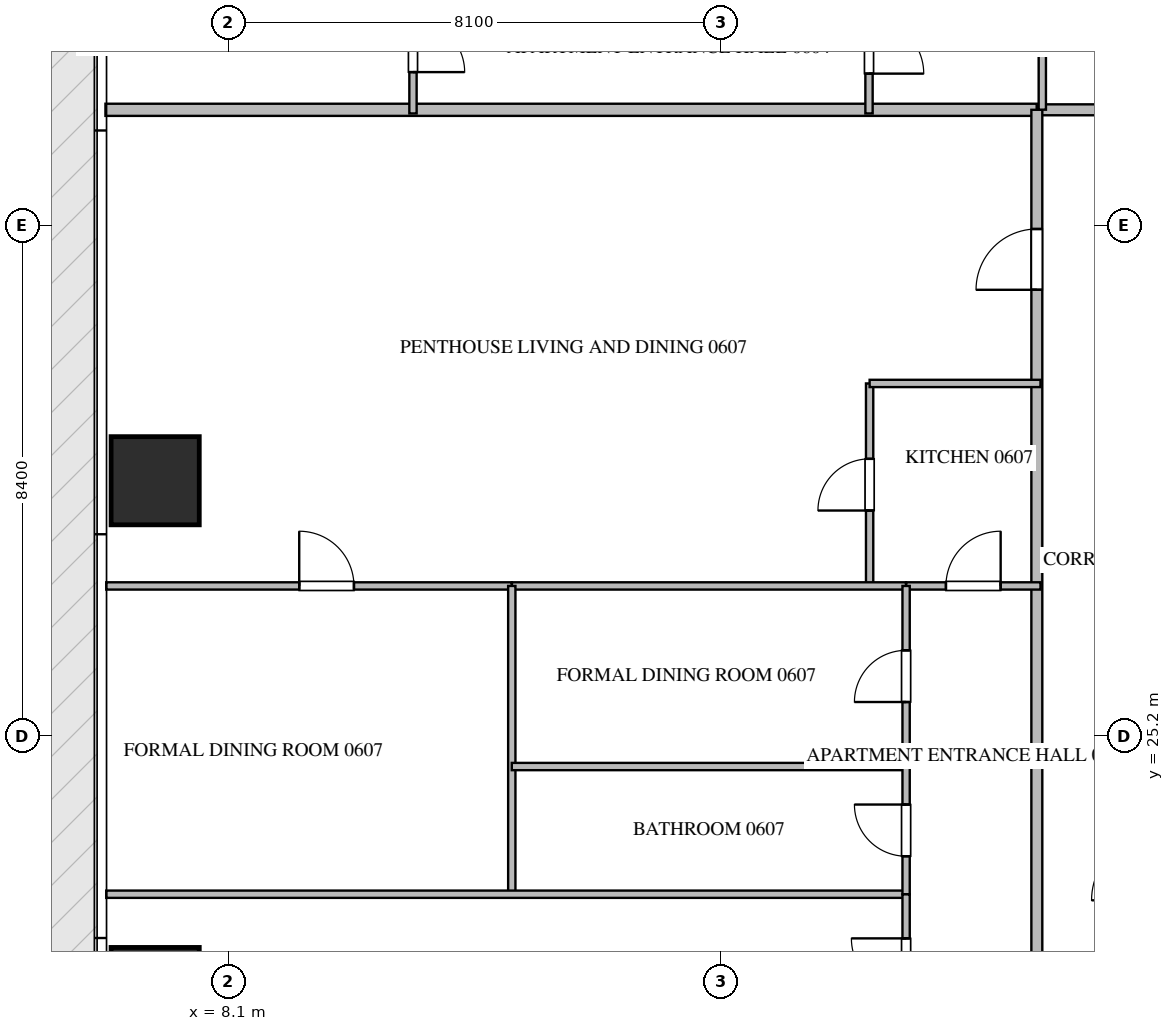
"""IFC4 building model, lengths in metres.
Left out: names, types, materials, properties, quantities, classifications, styles, units other than length and angle.
Written with IfcOpenShell. Run it as: python <this file> out.ifc"""

import sys

from ifc_helpers import new_model, si_unit, direction, frame, frame_2d, origin, origin_2d, place, context, subcontext, project, spatial, rectangle, extrude, source, transform, mapped, element, fill, save


model = new_model("IFC4")
c1 = context("Model", 3, precision=1e-05, world=origin(), true_north=direction((0.0, 1.0)))
c2 = subcontext(c1, "Body", "Model", "MODEL_VIEW")
j1 = project(units=[si_unit("LENGTHUNIT", "METRE"), si_unit("PLANEANGLEUNIT", "RADIAN")], contexts=[c1])
p1 = place(None, origin())
s1 = spatial("IfcSite", under=j1, at=p1, CompositionType="ELEMENT")
p2 = place(p1, origin())
s2 = spatial("IfcBuilding", under=s1, at=p2, CompositionType="ELEMENT")
p3 = place(p2, frame((0.0, 0.0, 30.45)))
s3 = spatial("IfcBuildingStorey", under=s2, at=p3, CompositionType="ELEMENT", Elevation=30.45)
m1 = source(origin(), c2, "Body", "SweptSolid", [
    extrude(rectangle(XDim=1.45, YDim=1.45, at=origin_2d()), origin(), (0.0, 0.0, 1.0), 3.75),
])
for number, where, z_axis, x_axis in (
    (1, (6.9, 21.0, -0.26), (0.0, 0.0, 1.0), (1.0, 0.0, 0.0)),
    (2, (6.9, 29.4, -0.26), (0.0, 0.0, 1.0), (1.0, 0.0, 0.0)),
):
    element("IfcColumn", number, at=place(p3, frame(where, z_axis=z_axis, x_axis=x_axis)), inside=s3, PredefinedType="COLUMN", context=c2, shape_type="MappedRepresentation", body=[
        mapped(m1, transform((0.0, 0.0, 0.0), scale=1.0)),
    ])
p4 = place(p3, frame((6.082, 35.5, 0.0), z_axis=(0.0, 0.0, 1.0), x_axis=(1.0, 0.0, 0.0)))
e3 = element("IfcWall", 3, at=p4, inside=s3, PredefinedType="PARTITIONING", context=c2, shape_type="SweptSolid", body=[
    extrude(rectangle(XDim=15.318, YDim=0.2, at=frame_2d((7.659, 0.0))), origin(), (0.0, 0.0, 1.0), 3.49),
])
p5 = place(p3, frame((21.402, 35.5, 0.0), z_axis=(0.0, 0.0, 1.0), x_axis=(1.0, 0.0, 0.0)))
e4 = element("IfcWall", 4, at=p5, inside=s3, PredefinedType="PARTITIONING", context=c2, shape_type="SweptSolid", body=[
    extrude(rectangle(XDim=21.996, YDim=0.18, at=frame_2d((10.998, 0.0))), origin(), (0.0, 0.0, 1.0), 3.49),
])
p6 = place(p5, frame((2.1, 0.0, 0.0)))
e5 = element("IfcOpeningElement", 5, at=p6, cuts=e4, PredefinedType="OPENING", context=c2, shape_type="SweptSolid", body=[
    extrude(rectangle(XDim=1.0, YDim=2.15, at=frame_2d((0.5, 1.075))), frame((0.0, 0.1, 0.0), z_axis=(0.0, -1.0, 0.0), x_axis=(1.0, 0.0, 0.0)), (0.0, 0.0, 1.0), 0.2),
])
p7 = place(p5, frame((14.277, 0.0, 0.0)))
e6 = element("IfcOpeningElement", 6, at=p7, cuts=e4, PredefinedType="OPENING", context=c2, shape_type="SweptSolid", body=[
    extrude(rectangle(XDim=1.0, YDim=2.15, at=frame_2d((0.5, 1.075))), frame((0.0, 0.1, 0.0), z_axis=(0.0, -1.0, 0.0), x_axis=(1.0, 0.0, 0.0)), (0.0, 0.0, 1.0), 0.2),
])
p8 = place(p5, frame((18.896, 0.0, 0.0)))
e7 = element("IfcOpeningElement", 7, at=p8, cuts=e4, PredefinedType="OPENING", context=c2, shape_type="SweptSolid", body=[
    extrude(rectangle(XDim=1.0, YDim=2.15, at=frame_2d((0.5, 1.075))), frame((0.0, 0.1, 0.0), z_axis=(0.0, -1.0, 0.0), x_axis=(1.0, 0.0, 0.0)), (0.0, 0.0, 1.0), 0.2),
])
p9 = place(p3, frame((21.4, 14.9, 0.0), z_axis=(0.0, 0.0, 1.0), x_axis=(0.0, 1.0, 0.0)))
e8 = element("IfcWall", 8, at=p9, inside=s3, PredefinedType="PARTITIONING", context=c2, shape_type="SweptSolid", body=[
    extrude(rectangle(XDim=20.6, YDim=0.18, at=frame_2d((10.3, 0.0))), origin(), (0.0, 0.0, 1.0), 3.49),
])
p10 = place(p9, frame((17.64, 0.0, 0.0)))
e9 = element("IfcOpeningElement", 9, at=p10, cuts=e8, PredefinedType="OPENING", context=c2, shape_type="SweptSolid", body=[
    extrude(rectangle(XDim=1.0, YDim=2.15, at=frame_2d((0.5, 1.075))), frame((0.0, 0.1, 0.0), z_axis=(0.0, -1.0, 0.0), x_axis=(1.0, 0.0, 0.0)), (0.0, 0.0, 1.0), 0.2),
])
p11 = place(p3, frame((21.49, 38.25, 0.0), z_axis=(0.0, 0.0, 1.0), x_axis=(0.0, -1.0, 0.0)))
e10 = element("IfcWall", 10, at=p11, inside=s3, PredefinedType="PARTITIONING", context=c2, shape_type="SweptSolid", body=[
    extrude(rectangle(XDim=2.748, YDim=0.12, at=frame_2d((1.374, 0.0))), origin(), (0.0, 0.0, 1.0), 3.49),
])
p12 = place(p3, frame((18.64, 37.65, 0.0), z_axis=(0.0, 0.0, 1.0), x_axis=(0.0, -1.0, 0.0)))
e11 = element("IfcWall", 11, at=p12, inside=s3, PredefinedType="PARTITIONING", context=c2, shape_type="SweptSolid", body=[
    extrude(rectangle(XDim=2.21, YDim=0.12, at=frame_2d((1.105, 0.0))), origin(), (0.0, 0.0, 1.0), 3.49),
])
p13 = place(p12, frame((0.655, 0.0, 0.0)))
e12 = element("IfcOpeningElement", 12, at=p13, cuts=e11, PredefinedType="OPENING", context=c2, shape_type="SweptSolid", body=[
    extrude(rectangle(XDim=0.9, YDim=2.1, at=frame_2d((0.45, 1.05))), frame((0.0, 0.07, 0.0), z_axis=(0.0, -1.0, 0.0), x_axis=(1.0, 0.0, 0.0)), (0.0, 0.0, 1.0), 0.14),
])
p14 = place(p3, frame((11.14, 37.65, 0.0), z_axis=(0.0, 0.0, 1.0), x_axis=(0.0, -1.0, 0.0)))
e13 = element("IfcWall", 13, at=p14, inside=s3, PredefinedType="PARTITIONING", context=c2, shape_type="SweptSolid", body=[
    extrude(rectangle(XDim=2.21, YDim=0.12, at=frame_2d((1.105, 0.0))), origin(), (0.0, 0.0, 1.0), 3.49),
])
p15 = place(p14, frame((0.68, 0.0, 0.0)))
e14 = element("IfcOpeningElement", 14, at=p15, cuts=e13, PredefinedType="OPENING", context=c2, shape_type="SweptSolid", body=[
    extrude(rectangle(XDim=0.85, YDim=2.1, at=frame_2d((0.425, 1.05))), frame((0.0, 0.07, 0.0), z_axis=(0.0, -1.0, 0.0), x_axis=(1.0, 0.0, 0.0)), (0.0, 0.0, 1.0), 0.14),
])
p16 = place(p3, frame((18.65, 27.67, 0.0), z_axis=(0.0, 0.0, 1.0), x_axis=(0.0, 1.0, 0.0)))
e15 = element("IfcWall", 15, at=p16, inside=s3, PredefinedType="PARTITIONING", context=c2, shape_type="SweptSolid", body=[
    extrude(rectangle(XDim=3.33, YDim=0.12, at=frame_2d((1.665, 0.0))), origin(), (0.0, 0.0, 1.0), 3.49),
])
p17 = place(p16, frame((1.24, 0.0, 0.0)))
e16 = element("IfcOpeningElement", 16, at=p17, cuts=e15, PredefinedType="OPENING", context=c2, shape_type="SweptSolid", body=[
    extrude(rectangle(XDim=0.85, YDim=2.1, at=frame_2d((0.425, 1.05))), frame((0.0, 0.07, 0.0), z_axis=(0.0, -1.0, 0.0), x_axis=(1.0, 0.0, 0.0)), (0.0, 0.0, 1.0), 0.14),
])
p18 = place(p3, frame((18.65, 31.0, 0.0), z_axis=(0.0, 0.0, 1.0), x_axis=(1.0, 0.0, 0.0)))
e17 = element("IfcWall", 17, at=p18, inside=s3, PredefinedType="PARTITIONING", context=c2, shape_type="SweptSolid", body=[
    extrude(rectangle(XDim=2.81, YDim=0.12, at=frame_2d((1.405, 0.0))), origin(), (0.0, 0.0, 1.0), 3.49),
])
p19 = place(p3, frame((19.25, 27.67, 0.0), z_axis=(0.0, 0.0, 1.0), x_axis=(1.0, 0.0, 0.0)))
e18 = element("IfcWall", 18, at=p19, inside=s3, PredefinedType="PARTITIONING", context=c2, shape_type="SweptSolid", body=[
    extrude(rectangle(XDim=2.21, YDim=0.12, at=frame_2d((1.105, 0.0))), origin(), (0.0, 0.0, 1.0), 3.49),
])
p20 = place(p19, frame((0.655, 0.0, 0.0)))
e19 = element("IfcOpeningElement", 19, at=p20, cuts=e18, PredefinedType="OPENING", context=c2, shape_type="SweptSolid", body=[
    extrude(rectangle(XDim=0.9, YDim=2.1, at=frame_2d((0.45, 1.05))), frame((0.0, 0.07, 0.0), z_axis=(0.0, -1.0, 0.0), x_axis=(1.0, 0.0, 0.0)), (0.0, 0.0, 1.0), 0.14),
])
p21 = place(p3, frame((6.095, 27.67, 0.0), z_axis=(0.0, 0.0, 1.0), x_axis=(1.0, 0.0, 0.0)))
e20 = element("IfcWall", 20, at=p21, inside=s3, PredefinedType="PARTITIONING", context=c2, shape_type="SweptSolid", body=[
    extrude(rectangle(XDim=6.67, YDim=0.12, at=frame_2d((3.335, 0.0))), origin(), (0.0, 0.0, 1.0), 3.49),
])
p22 = place(p21, frame((3.174, 0.0, 0.0)))
e21 = element("IfcOpeningElement", 21, at=p22, cuts=e20, PredefinedType="OPENING", context=c2, shape_type="SweptSolid", body=[
    extrude(rectangle(XDim=0.9, YDim=2.1, at=frame_2d((0.45, 1.05))), frame((0.0, 0.07, 0.0), z_axis=(0.0, -1.0, 0.0), x_axis=(1.0, 0.0, 0.0)), (0.0, 0.0, 1.0), 0.14),
])
p23 = place(p3, frame((12.767, 27.67, 0.0), z_axis=(0.0, 0.0, 1.0), x_axis=(1.0, 0.0, 0.0)))
e22 = element("IfcWall", 22, at=p23, inside=s3, PredefinedType="PARTITIONING", context=c2, shape_type="SweptSolid", body=[
    extrude(rectangle(XDim=6.481, YDim=0.12, at=frame_2d((3.24, 0.0))), origin(), (0.0, 0.0, 1.0), 3.49),
])
p24 = place(p3, frame((12.765, 22.6, 0.0), z_axis=(0.0, 0.0, 1.0), x_axis=(0.0, 1.0, 0.0)))
e23 = element("IfcWall", 23, at=p24, inside=s3, PredefinedType="PARTITIONING", context=c2, shape_type="SweptSolid", body=[
    extrude(rectangle(XDim=5.07, YDim=0.12, at=frame_2d((2.535, 0.0))), origin(), (0.0, 0.0, 1.0), 3.49),
])
p25 = place(p3, frame((6.095, 22.6, 0.0), z_axis=(0.0, 0.0, 1.0), x_axis=(1.0, 0.0, 0.0)))
e24 = element("IfcWall", 24, at=p25, inside=s3, PredefinedType="PARTITIONING", context=c2, shape_type="SweptSolid", body=[
    extrude(rectangle(XDim=13.155, YDim=0.12, at=frame_2d((6.578, 0.0))), origin(), (0.0, 0.0, 1.0), 3.49),
])
p26 = place(p3, frame((12.765, 24.7, 0.0), z_axis=(0.0, 0.0, 1.0), x_axis=(1.0, 0.0, 0.0)))
e25 = element("IfcWall", 25, at=p26, inside=s3, PredefinedType="PARTITIONING", context=c2, shape_type="SweptSolid", body=[
    extrude(rectangle(XDim=6.485, YDim=0.12, at=frame_2d((3.243, 0.0))), origin(), (0.0, 0.0, 1.0), 3.49),
])
p27 = place(p3, frame((19.25, 22.6, 0.0), z_axis=(0.0, 0.0, 1.0), x_axis=(0.0, 1.0, 0.0)))
e26 = element("IfcWall", 26, at=p27, inside=s3, PredefinedType="PARTITIONING", context=c2, shape_type="SweptSolid", body=[
    extrude(rectangle(XDim=2.1, YDim=0.12, at=frame_2d((1.05, 0.0))), origin(), (0.0, 0.0, 1.0), 3.49),
])
p28 = place(p27, frame((0.625, 0.0, 0.0)))
e27 = element("IfcOpeningElement", 27, at=p28, cuts=e26, PredefinedType="OPENING", context=c2, shape_type="SweptSolid", body=[
    extrude(rectangle(XDim=0.85, YDim=2.1, at=frame_2d((0.425, 1.05))), frame((0.0, 0.07, 0.0), z_axis=(0.0, -1.0, 0.0), x_axis=(1.0, 0.0, 0.0)), (0.0, 0.0, 1.0), 0.14),
])
p29 = place(p3, frame((19.25, 24.702, 0.0), z_axis=(0.0, 0.0, 1.0), x_axis=(0.0, 1.0, 0.0)))
e28 = element("IfcWall", 28, at=p29, inside=s3, PredefinedType="PARTITIONING", context=c2, shape_type="SweptSolid", body=[
    extrude(rectangle(XDim=2.968, YDim=0.12, at=frame_2d((1.484, 0.0))), origin(), (0.0, 0.0, 1.0), 3.49),
])
p30 = place(p29, frame((1.059, 0.0, 0.0)))
e29 = element("IfcOpeningElement", 29, at=p30, cuts=e28, PredefinedType="OPENING", context=c2, shape_type="SweptSolid", body=[
    extrude(rectangle(XDim=0.85, YDim=2.1, at=frame_2d((0.425, 1.05))), frame((0.0, 0.07, 0.0), z_axis=(0.0, -1.0, 0.0), x_axis=(1.0, 0.0, 0.0)), (0.0, 0.0, 1.0), 0.14),
])
p31 = place(p3, frame((19.25, 20.25, 0.0), z_axis=(0.0, 0.0, 1.0), x_axis=(0.0, 1.0, 0.0)))
e30 = element("IfcWall", 30, at=p31, inside=s3, PredefinedType="PARTITIONING", context=c2, shape_type="SweptSolid", body=[
    extrude(rectangle(XDim=2.348, YDim=0.12, at=frame_2d((1.174, 0.0))), origin(), (0.0, 0.0, 1.0), 3.49),
])
p32 = place(p31, frame((0.724, 0.0, 0.0)))
e31 = element("IfcOpeningElement", 31, at=p32, cuts=e30, PredefinedType="OPENING", context=c2, shape_type="SweptSolid", body=[
    extrude(rectangle(XDim=0.9, YDim=2.1, at=frame_2d((0.45, 1.05))), frame((0.0, 0.07, 0.0), z_axis=(0.0, -1.0, 0.0), x_axis=(1.0, 0.0, 0.0)), (0.0, 0.0, 1.0), 0.14),
])
m2 = source(origin(), c2, "Body", "SweptSolid", [
    extrude(rectangle(XDim=1.0, YDim=2.15, at=frame_2d((0.5, 1.075))), frame((0.0, 0.025, 0.0), z_axis=(0.0, -1.0, 0.0), x_axis=(1.0, 0.0, 0.0)), (0.0, 0.0, 1.0), 0.05),
])
p33 = place(p10, origin())
e32 = element("IfcDoor", 32, at=p33, inside=s3, OperationType="SINGLE_SWING_LEFT", PredefinedType="DOOR", context=c2, shape_type="MappedRepresentation", body=[
    mapped(m2, transform((0.0, 0.0, 0.0), scale=1.0)),
])
fill(e9, e32)
m3 = source(origin(), c2, "Body", "SweptSolid", [
    extrude(rectangle(XDim=0.9, YDim=2.1, at=frame_2d((0.45, 1.05))), frame((0.0, 0.025, 0.0), z_axis=(0.0, -1.0, 0.0), x_axis=(1.0, 0.0, 0.0)), (0.0, 0.0, 1.0), 0.05),
])
p34 = place(p13, origin())
e33 = element("IfcDoor", 33, at=p34, inside=s3, OperationType="SINGLE_SWING_RIGHT", PredefinedType="DOOR", context=c2, shape_type="MappedRepresentation", body=[
    mapped(m3, transform((0.0, 0.0, 0.0), scale=1.0)),
])
fill(e12, e33)
m4 = source(origin(), c2, "Body", "SweptSolid", [
    extrude(rectangle(XDim=0.85, YDim=2.1, at=frame_2d((0.425, 1.05))), frame((0.0, 0.025, 0.0), z_axis=(0.0, -1.0, 0.0), x_axis=(1.0, 0.0, 0.0)), (0.0, 0.0, 1.0), 0.05),
])
p35 = place(p15, origin())
e34 = element("IfcDoor", 34, at=p35, inside=s3, OperationType="SINGLE_SWING_RIGHT", PredefinedType="DOOR", context=c2, shape_type="MappedRepresentation", body=[
    mapped(m4, transform((0.0, 0.0, 0.0), scale=1.0)),
])
fill(e14, e34)
p36 = place(p17, origin())
e35 = element("IfcDoor", 35, at=p36, inside=s3, OperationType="SINGLE_SWING_LEFT", PredefinedType="DOOR", context=c2, shape_type="MappedRepresentation", body=[
    mapped(m4, transform((0.0, 0.0, 0.0), scale=1.0)),
])
fill(e16, e35)
p37 = place(p20, origin())
e36 = element("IfcDoor", 36, at=p37, inside=s3, OperationType="SINGLE_SWING_RIGHT", PredefinedType="DOOR", context=c2, shape_type="MappedRepresentation", body=[
    mapped(m3, transform((0.0, 0.0, 0.0), scale=1.0)),
])
fill(e19, e36)
p38 = place(p22, origin())
e37 = element("IfcDoor", 37, at=p38, inside=s3, OperationType="SINGLE_SWING_LEFT", PredefinedType="DOOR", context=c2, shape_type="MappedRepresentation", body=[
    mapped(m3, transform((0.0, 0.0, 0.0), scale=1.0)),
])
fill(e21, e37)
p39 = place(p28, origin())
e38 = element("IfcDoor", 38, at=p39, inside=s3, OperationType="SINGLE_SWING_RIGHT", PredefinedType="DOOR", context=c2, shape_type="MappedRepresentation", body=[
    mapped(m4, transform((0.0, 0.0, 0.0), scale=1.0)),
])
fill(e27, e38)
p40 = place(p30, origin())
e39 = element("IfcDoor", 39, at=p40, inside=s3, OperationType="SINGLE_SWING_LEFT", PredefinedType="DOOR", context=c2, shape_type="MappedRepresentation", body=[
    mapped(m4, transform((0.0, 0.0, 0.0), scale=1.0)),
])
fill(e29, e39)
p41 = place(p32, origin())
e40 = element("IfcDoor", 40, at=p41, inside=s3, OperationType="SINGLE_SWING_RIGHT", PredefinedType="DOOR", context=c2, shape_type="MappedRepresentation", body=[
    mapped(m3, transform((0.0, 0.0, 0.0), scale=1.0)),
])
fill(e31, e40)
save(model, sys.argv[1])
